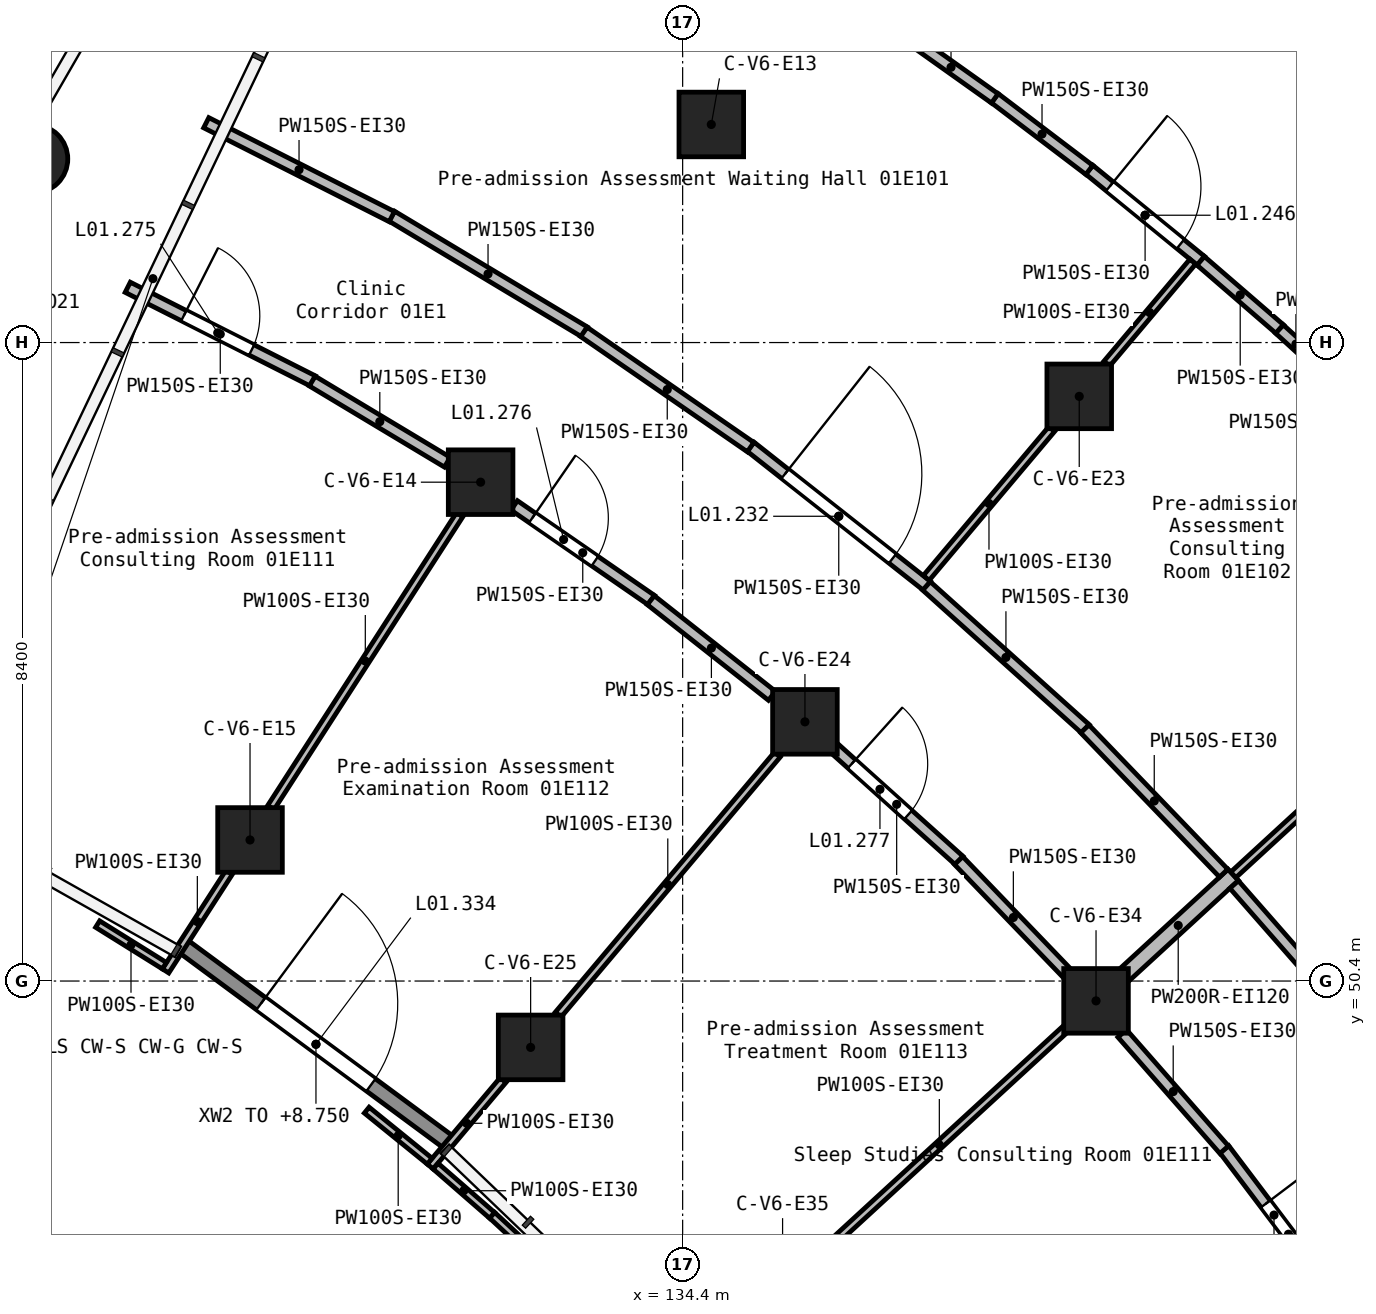
"""IFC4 building model, lengths in metres.
Left out: names, types, materials, properties, quantities, classifications, styles, units other than length and angle.
Written with IfcOpenShell. Run it as: python <this file> out.ifc"""

import sys

from ifc_helpers import new_model, si_unit, direction, frame, frame_2d, origin, origin_2d, place, context, subcontext, project, spatial, rectangle, circle, extrude, element, fill, save


model = new_model("IFC4")
c1 = context("Model", 3, precision=1e-05, world=origin(), true_north=direction((0.0, 1.0)))
c2 = subcontext(c1, "Body", "Model", "MODEL_VIEW")
j1 = project(units=[si_unit("LENGTHUNIT", "METRE"), si_unit("PLANEANGLEUNIT", "RADIAN")], contexts=[c1])
p1 = place(None, origin())
s1 = spatial("IfcSite", under=j1, at=p1, CompositionType="ELEMENT")
p2 = place(p1, origin())
s2 = spatial("IfcBuilding", under=s1, at=p2, CompositionType="ELEMENT")
p3 = place(p2, frame((0.0, 0.0, 5.4)))
s3 = spatial("IfcBuildingStorey", under=s2, at=p3, CompositionType="ELEMENT", Elevation=5.4)
p4 = place(p3, frame((125.86, 61.216, 0.0), z_axis=(0.0, 0.0, 1.0), x_axis=(1.0, 0.0, 0.0)))
e1 = element("IfcColumn", 1, at=p4, inside=s3, PredefinedType="COLUMN", context=c2, shape_type="SweptSolid", body=[
    extrude(circle(Radius=0.45, at=origin_2d()), origin(), (0.0, 0.0, 1.0), 4.5),
])
for number, where, z_axis, x_axis in (
    (2, (128.708, 52.256, 0.0), (0.0, 0.0, 1.0), (1.0, 0.0, 0.0)),
    (3, (131.742, 56.963, 0.0), (0.0, 0.0, 1.0), (1.0, 0.0, 0.0)),
    (4, (132.4, 49.527, 0.0), (0.0, 0.0, 1.0), (1.0, 0.0, 0.0)),
    (5, (134.777, 61.669, 0.0), (0.0, 0.0, 1.0), (1.0, 0.0, 0.0)),
    (6, (136.009, 53.81, 0.0), (0.0, 0.0, 1.0), (1.0, 0.0, 0.0)),
    (7, (139.618, 58.092, 0.0), (0.0, 0.0, 1.0), (1.0, 0.0, 0.0)),
    (8, (139.839, 50.139, 0.0), (0.0, 0.0, 1.0), (1.0, 0.0, 0.0)),
):
    element("IfcColumn", number, at=place(p3, frame(where, z_axis=z_axis, x_axis=x_axis)), inside=s3, PredefinedType="COLUMN", context=c2, shape_type="SweptSolid", body=[
        extrude(rectangle(XDim=0.85, YDim=0.85, at=origin_2d()), origin(), (0.0, 0.0, 1.0), 4.5),
    ])
p5 = place(p3, frame((127.819, 50.866, 0.0), z_axis=(0.0, 0.0, 1.0), x_axis=(0.804238862444, -0.594306193923, 0.0)))
e9 = element("IfcWall", 9, at=p5, inside=s3, PredefinedType="STANDARD", context=c2, shape_type="SweptSolid", body=[
    extrude(rectangle(XDim=4.368, YDim=0.2, at=frame_2d((2.184, 0.0))), origin(), (0.0, 0.0, 1.0), 3.35),
])
p6 = place(p5, frame((1.284, 0.0, 0.0)))
e10 = element("IfcOpeningElement", 10, at=p6, cuts=e9, PredefinedType="OPENING", context=c2, shape_type="SweptSolid", body=[
    extrude(rectangle(XDim=1.8, YDim=2.4, at=frame_2d((0.9, 1.2))), frame((0.0, 0.11, 0.0), z_axis=(0.0, -1.0, 0.0), x_axis=(1.0, 0.0, 0.0)), (0.0, 0.0, 1.0), 0.22),
])
p7 = place(p3, frame((140.196, 50.467, 0.0), z_axis=(0.0, 0.0, 1.0), x_axis=(0.736519787736, 0.676415997943, 0.0)))
e11 = element("IfcWall", 11, at=p7, inside=s3, PredefinedType="SOLIDWALL", context=c2, shape_type="SweptSolid", body=[
    extrude(rectangle(XDim=1.966, YDim=0.2, at=frame_2d((0.983, 0.0))), origin(), (0.0, 0.0, 1.0), 4.15),
])
p8 = place(p3, frame((135.293, 57.43, 0.0), z_axis=(0.0, 0.0, 1.0), x_axis=(0.785039104315, -0.619446208073, 0.0)))
e12 = element("IfcWall", 12, at=p8, inside=s3, PredefinedType="PARTITIONING", context=c2, shape_type="SweptSolid", body=[
    extrude(rectangle(XDim=2.958, YDim=0.15, at=frame_2d((1.479, 0.0))), origin(), (0.0, 0.0, 1.0), 4.15),
])
p9 = place(p8, frame((0.579, 0.0, 0.0)))
e13 = element("IfcOpeningElement", 13, at=p9, cuts=e12, PredefinedType="OPENING", context=c2, shape_type="SweptSolid", body=[
    extrude(rectangle(XDim=1.8, YDim=2.1, at=frame_2d((0.9, 1.05))), frame((0.0, 0.085, 0.0), z_axis=(0.0, -1.0, 0.0), x_axis=(1.0, 0.0, 0.0)), (0.0, 0.0, 1.0), 0.17),
])
p10 = place(p3, frame((130.572, 60.464, 0.0), z_axis=(0.0, 0.0, 1.0), x_axis=(0.857369075188, -0.514702116676, 0.0)))
e14 = element("IfcWall", 14, at=p10, inside=s3, PredefinedType="PARTITIONING", context=c2, shape_type="SweptSolid", body=[
    extrude(rectangle(XDim=2.958, YDim=0.15, at=frame_2d((1.479, 0.0))), origin(), (0.0, 0.0, 1.0), 4.15),
])
p11 = place(p3, frame((141.656, 51.669, 0.0), z_axis=(0.0, 0.0, 1.0), x_axis=(0.659076402407, -0.752075990702, 0.0)))
e15 = element("IfcWall", 15, at=p11, inside=s3, PredefinedType="PARTITIONING", context=c2, shape_type="SweptSolid", body=[
    extrude(rectangle(XDim=2.78, YDim=0.15, at=frame_2d((1.39, 0.0))), origin(), (0.0, 0.0, 1.0), 4.15),
])
p12 = place(p3, frame((137.608, 55.598, 0.0), z_axis=(0.0, 0.0, 1.0), x_axis=(0.743501368773, -0.668734412628, 0.0)))
e16 = element("IfcWall", 16, at=p12, inside=s3, PredefinedType="PARTITIONING", context=c2, shape_type="SweptSolid", body=[
    extrude(rectangle(XDim=2.812, YDim=0.15, at=frame_2d((1.406, 0.0))), origin(), (0.0, 0.0, 1.0), 4.15),
])
p13 = place(p3, frame((133.101, 58.94, 0.0), z_axis=(0.0, 0.0, 1.0), x_axis=(0.822620530797, -0.568590768754, 0.0)))
e17 = element("IfcWall", 17, at=p13, inside=s3, PredefinedType="PARTITIONING", context=c2, shape_type="SweptSolid", body=[
    extrude(rectangle(XDim=2.666, YDim=0.15, at=frame_2d((1.333, 0.0))), origin(), (0.0, 0.0, 1.0), 4.15),
])
p14 = place(p3, frame((139.691, 53.718, 0.0), z_axis=(0.0, 0.0, 1.0), x_axis=(0.693447550136, -0.720507109757, 0.0)))
e18 = element("IfcWall", 18, at=p14, inside=s3, PredefinedType="PARTITIONING", context=c2, shape_type="SweptSolid", body=[
    extrude(rectangle(XDim=2.635, YDim=0.15, at=frame_2d((1.317, 0.0))), origin(), (0.0, 0.0, 1.0), 4.15),
])
p15 = place(p3, frame((128.132, 61.692, 0.0), z_axis=(0.0, 0.0, 1.0), x_axis=(0.892275475515, -0.45149139061, 0.0)))
e19 = element("IfcWall", 19, at=p15, inside=s3, PredefinedType="PARTITIONING", context=c2, shape_type="SweptSolid", body=[
    extrude(rectangle(XDim=2.736, YDim=0.15, at=frame_2d((1.368, 0.0))), origin(), (0.0, 0.0, 1.0), 4.15),
])
p16 = place(p3, frame((136.393, 53.465, 0.0), z_axis=(0.0, 0.0, 1.0), x_axis=(0.743617683722, -0.668605070618, 0.0)))
e20 = element("IfcWall", 20, at=p16, inside=s3, PredefinedType="PARTITIONING", context=c2, shape_type="SweptSolid", body=[
    extrude(rectangle(XDim=2.213, YDim=0.15, at=frame_2d((1.106, 0.0))), origin(), (0.0, 0.0, 1.0), 4.15),
])
p17 = place(p16, frame((0.311, 0.0, 0.0)))
e21 = element("IfcOpeningElement", 21, at=p17, cuts=e20, PredefinedType="OPENING", context=c2, shape_type="SweptSolid", body=[
    extrude(rectangle(XDim=1.0, YDim=2.1, at=frame_2d((0.5, 1.05))), frame((0.0, 0.085, 0.0), z_axis=(0.0, -1.0, 0.0), x_axis=(1.0, 0.0, 0.0)), (0.0, 0.0, 1.0), 0.17),
])
p18 = place(p3, frame((132.184, 56.658, 0.0), z_axis=(0.0, 0.0, 1.0), x_axis=(0.82273696549, -0.568422277551, 0.0)))
e22 = element("IfcWall", 22, at=p18, inside=s3, PredefinedType="PARTITIONING", context=c2, shape_type="SweptSolid", body=[
    extrude(rectangle(XDim=2.193, YDim=0.15, at=frame_2d((1.096, 0.0))), origin(), (0.0, 0.0, 1.0), 4.15),
])
p19 = place(p18, frame((0.29, 0.0, 0.0)))
e23 = element("IfcOpeningElement", 23, at=p19, cuts=e22, PredefinedType="OPENING", context=c2, shape_type="SweptSolid", body=[
    extrude(rectangle(XDim=1.0, YDim=2.1, at=frame_2d((0.5, 1.05))), frame((0.0, 0.085, 0.0), z_axis=(0.0, -1.0, 0.0), x_axis=(1.0, 0.0, 0.0)), (0.0, 0.0, 1.0), 0.17),
])
p20 = place(p3, frame((141.526, 48.188, 0.0), z_axis=(0.0, 0.0, 1.0), x_axis=(0.60280129331, -0.797891346477, 0.0)))
e24 = element("IfcWall", 24, at=p20, inside=s3, PredefinedType="PARTITIONING", context=c2, shape_type="SweptSolid", body=[
    extrude(rectangle(XDim=2.172, YDim=0.15, at=frame_2d((1.086, 0.0))), origin(), (0.0, 0.0, 1.0), 4.15),
])
p21 = place(p20, frame((0.902, 0.0, 0.0)))
e25 = element("IfcOpeningElement", 25, at=p21, cuts=e24, PredefinedType="OPENING", context=c2, shape_type="SweptSolid", body=[
    extrude(rectangle(XDim=1.0, YDim=2.1, at=frame_2d((0.5, 1.05))), frame((0.0, 0.085, 0.0), z_axis=(0.0, -1.0, 0.0), x_axis=(1.0, 0.0, 0.0)), (0.0, 0.0, 1.0), 0.17),
])
p22 = place(p3, frame((127.099, 59.527, 0.0), z_axis=(0.0, 0.0, 1.0), x_axis=(0.892287657908, -0.451467313928, 0.0)))
e26 = element("IfcWall", 26, at=p22, inside=s3, PredefinedType="PARTITIONING", context=c2, shape_type="SweptSolid", body=[
    extrude(rectangle(XDim=2.729, YDim=0.15, at=frame_2d((1.364, 0.0))), origin(), (0.0, 0.0, 1.0), 4.15),
])
p23 = place(p22, frame((0.827, 0.0, 0.0)))
e27 = element("IfcOpeningElement", 27, at=p23, cuts=e26, PredefinedType="OPENING", context=c2, shape_type="SweptSolid", body=[
    extrude(rectangle(XDim=1.0, YDim=2.1, at=frame_2d((0.5, 1.05))), frame((0.0, 0.085, 0.0), z_axis=(0.0, -1.0, 0.0), x_axis=(1.0, 0.0, 0.0)), (0.0, 0.0, 1.0), 0.17),
])
p24 = place(p3, frame((133.981, 55.41, 0.0), z_axis=(0.0, 0.0, 1.0), x_axis=(0.784968928218, -0.619535133574, 0.0)))
e28 = element("IfcWall", 28, at=p24, inside=s3, PredefinedType="PARTITIONING", context=c2, shape_type="SweptSolid", body=[
    extrude(rectangle(XDim=2.031, YDim=0.15, at=frame_2d((1.015, 0.0))), origin(), (0.0, 0.0, 1.0), 4.15),
])
p25 = place(p3, frame((129.527, 58.293, 0.0), z_axis=(0.0, 0.0, 1.0), x_axis=(0.8573370195, -0.514755509922, 0.0)))
e29 = element("IfcWall", 29, at=p25, inside=s3, PredefinedType="PARTITIONING", context=c2, shape_type="SweptSolid", body=[
    extrude(rectangle(XDim=2.073, YDim=0.15, at=frame_2d((1.037, 0.0))), origin(), (0.0, 0.0, 1.0), 4.15),
])
p26 = place(p3, frame((140.184, 49.71, 0.0), z_axis=(0.0, 0.0, 1.0), x_axis=(0.659209376091, -0.751959439381, 0.0)))
e30 = element("IfcWall", 30, at=p26, inside=s3, PredefinedType="PARTITIONING", context=c2, shape_type="SweptSolid", body=[
    extrude(rectangle(XDim=2.035, YDim=0.15, at=frame_2d((1.017, 0.0))), origin(), (0.0, 0.0, 1.0), 4.15),
])
p27 = place(p3, frame((138.031, 51.985, 0.0), z_axis=(0.0, 0.0, 1.0), x_axis=(0.693216793474, -0.7207291289, 0.0)))
e31 = element("IfcWall", 31, at=p27, inside=s3, PredefinedType="PARTITIONING", context=c2, shape_type="SweptSolid", body=[
    extrude(rectangle(XDim=2.076, YDim=0.15, at=frame_2d((1.038, 0.0))), origin(), (0.0, 0.0, 1.0), 4.15),
])
p28 = place(p3, frame((139.75, 61.074, 0.0), z_axis=(0.0, 0.0, 1.0), x_axis=(0.774713973469, -0.63231183708, 0.0)))
e32 = element("IfcWall", 32, at=p28, inside=s3, PredefinedType="PARTITIONING", context=c2, shape_type="SweptSolid", body=[
    extrude(rectangle(XDim=1.896, YDim=0.15, at=frame_2d((0.948, 0.0))), origin(), (0.0, 0.0, 1.0), 4.15),
])
p29 = place(p28, frame((0.348, 0.0, 0.0)))
e33 = element("IfcOpeningElement", 33, at=p29, cuts=e32, PredefinedType="OPENING", context=c2, shape_type="SweptSolid", body=[
    extrude(rectangle(XDim=1.2, YDim=2.1, at=frame_2d((0.6, 1.05))), frame((0.0, 0.085, 0.0), z_axis=(0.0, -1.0, 0.0), x_axis=(1.0, 0.0, 0.0)), (0.0, 0.0, 1.0), 0.17),
])
p30 = place(p3, frame((138.506, 62.015, 0.0), z_axis=(0.0, 0.0, 1.0), x_axis=(0.7964030968, -0.604766159278, 0.0)))
e34 = element("IfcWall", 34, at=p30, inside=s3, PredefinedType="PARTITIONING", context=c2, shape_type="SweptSolid", body=[
    extrude(rectangle(XDim=1.562, YDim=0.15, at=frame_2d((0.781, 0.0))), origin(), (0.0, 0.0, 1.0), 4.15),
])
p31 = place(p3, frame((137.355, 62.831, 0.0), z_axis=(0.0, 0.0, 1.0), x_axis=(0.815004293048, -0.579454918276, 0.0)))
e35 = element("IfcWall", 35, at=p31, inside=s3, PredefinedType="PARTITIONING", context=c2, shape_type="SweptSolid", body=[
    extrude(rectangle(XDim=1.413, YDim=0.15, at=frame_2d((0.706, 0.0))), origin(), (0.0, 0.0, 1.0), 4.15),
])
p32 = place(p3, frame((141.216, 59.875, 0.0), z_axis=(0.0, 0.0, 1.0), x_axis=(0.7566031668, -0.653874336542, 0.0)))
e36 = element("IfcWall", 36, at=p32, inside=s3, PredefinedType="PARTITIONING", context=c2, shape_type="SweptSolid", body=[
    extrude(rectangle(XDim=1.374, YDim=0.15, at=frame_2d((0.687, 0.0))), origin(), (0.0, 0.0, 1.0), 4.15),
])
p33 = place(p3, frame((142.253, 58.977, 0.0), z_axis=(0.0, 0.0, 1.0), x_axis=(0.739127036188, -0.673566050492, 0.0)))
e37 = element("IfcWall", 37, at=p33, inside=s3, PredefinedType="PARTITIONING", context=c2, shape_type="SweptSolid", body=[
    extrude(rectangle(XDim=0.585, YDim=0.15, at=frame_2d((0.292, 0.0))), origin(), (0.0, 0.0, 1.0), 4.15),
])
p34 = place(p3, frame((131.079, 47.96, 0.0), z_axis=(0.0, 0.0, 1.0), x_axis=(0.644403525256, 0.764685619479, 0.0)))
e38 = element("IfcWall", 38, at=p34, inside=s3, PredefinedType="PARTITIONING", context=c2, shape_type="SweptSolid", body=[
    extrude(rectangle(XDim=1.488, YDim=0.1, at=frame_2d((0.744, 0.0))), origin(), (0.0, 0.0, 1.0), 4.15),
])
p35 = place(p3, frame((132.762, 49.958, 0.0), z_axis=(0.0, 0.0, 1.0), x_axis=(0.644429680937, 0.76466357722, 0.0)))
e39 = element("IfcWall", 39, at=p35, inside=s3, PredefinedType="PARTITIONING", context=c2, shape_type="SweptSolid", body=[
    extrude(rectangle(XDim=4.475, YDim=0.1, at=frame_2d((2.238, 0.0))), origin(), (0.0, 0.0, 1.0), 4.15),
])
p36 = place(p3, frame((127.597, 50.533, 0.0), z_axis=(0.0, 0.0, 1.0), x_axis=(0.541741092646, 0.840545411348, 0.0)))
e40 = element("IfcWall", 40, at=p36, inside=s3, PredefinedType="PARTITIONING", context=c2, shape_type="SweptSolid", body=[
    extrude(rectangle(XDim=1.543, YDim=0.1, at=frame_2d((0.771, 0.0))), origin(), (0.0, 0.0, 1.0), 4.15),
])
p37 = place(p3, frame((128.983, 52.683, 0.0), z_axis=(0.0, 0.0, 1.0), x_axis=(0.541806664818, 0.840503145716, 0.0)))
e41 = element("IfcWall", 41, at=p37, inside=s3, PredefinedType="PARTITIONING", context=c2, shape_type="SweptSolid", body=[
    extrude(rectangle(XDim=4.585, YDim=0.1, at=frame_2d((2.293, 0.0))), origin(), (0.0, 0.0, 1.0), 4.15),
])
p38 = place(p3, frame((136.111, 46.715, 0.0), z_axis=(0.0, 0.0, 1.0), x_axis=(0.736475017651, 0.676464742892, 0.0)))
e42 = element("IfcWall", 42, at=p38, inside=s3, PredefinedType="PARTITIONING", context=c2, shape_type="SweptSolid", body=[
    extrude(rectangle(XDim=4.524, YDim=0.1, at=frame_2d((2.262, 0.0))), origin(), (0.0, 0.0, 1.0), 4.15),
])
p39 = place(p3, frame((141.645, 51.798, 0.0), z_axis=(0.0, 0.0, 1.0), x_axis=(0.73658314114, 0.676347008709, 0.0)))
e43 = element("IfcWall", 43, at=p39, inside=s3, PredefinedType="PARTITIONING", context=c2, shape_type="SweptSolid", body=[
    extrude(rectangle(XDim=2.61, YDim=0.1, at=frame_2d((1.305, 0.0))), origin(), (0.0, 0.0, 1.0), 4.15),
])
p40 = place(p3, frame((137.605, 55.704, 0.0), z_axis=(0.0, 0.0, 1.0), x_axis=(0.644432238292, 0.764661421971, 0.0)))
e44 = element("IfcWall", 44, at=p40, inside=s3, PredefinedType="PARTITIONING", context=c2, shape_type="SweptSolid", body=[
    extrude(rectangle(XDim=2.561, YDim=0.1, at=frame_2d((1.28, 0.0))), origin(), (0.0, 0.0, 1.0), 4.15),
])
p41 = place(p3, frame((139.98, 58.522, 0.0), z_axis=(0.0, 0.0, 1.0), x_axis=(0.644495278204, 0.7646082895, 0.0)))
e45 = element("IfcWall", 45, at=p41, inside=s3, PredefinedType="PARTITIONING", context=c2, shape_type="SweptSolid", body=[
    extrude(rectangle(XDim=1.756, YDim=0.1, at=frame_2d((0.878, 0.0))), origin(), (0.0, 0.0, 1.0), 4.15),
])
p42 = place(p3, frame((130.243, 48.701, 0.0), z_axis=(0.0, 0.0, 1.0), x_axis=(0.776695177638, -0.629876655413, 0.0)))
e46 = element("IfcWall", 46, at=p42, inside=s3, PredefinedType="PARTITIONING", context=c2, shape_type="SweptSolid", body=[
    extrude(rectangle(XDim=1.066, YDim=0.1, at=frame_2d((0.533, 0.0))), origin(), (0.0, 0.0, 1.0), 4.15),
])
p43 = place(p3, frame((126.703, 51.149, 0.0), z_axis=(0.0, 0.0, 1.0), x_axis=(0.848687049906, -0.528895350067, 0.0)))
e47 = element("IfcWall", 47, at=p43, inside=s3, PredefinedType="PARTITIONING", context=c2, shape_type="SweptSolid", body=[
    extrude(rectangle(XDim=1.034, YDim=0.1, at=frame_2d((0.517, 0.0))), origin(), (0.0, 0.0, 1.0), 4.15),
])
p44 = place(p3, frame((131.892, 47.32, 0.0), z_axis=(0.0, 0.0, 1.0), x_axis=(0.732793491626, -0.680451099367, 0.0)))
e48 = element("IfcWall", 48, at=p44, inside=s3, PredefinedType="PARTITIONING", context=c2, shape_type="SweptSolid", body=[
    extrude(rectangle(XDim=1.185, YDim=0.1, at=frame_2d((0.592, 0.0))), origin(), (0.0, 0.0, 1.0), 4.15),
])
p45 = place(p3, frame((131.149, 47.965, 0.0), z_axis=(0.0, 0.0, 1.0), x_axis=(0.75424788942, -0.656589766373, 0.0)))
e49 = element("IfcWall", 49, at=p45, inside=s3, PredefinedType="PARTITIONING", context=c2, shape_type="SweptSolid", body=[
    extrude(rectangle(XDim=0.985, YDim=0.1, at=frame_2d((0.492, 0.0))), origin(), (0.0, 0.0, 1.0), 4.15),
])
p46 = place(p6, origin())
e50 = element("IfcDoor", 50, at=p46, inside=s3, OperationType="SINGLE_SWING_LEFT", PredefinedType="DOOR", context=c2, shape_type="SweptSolid", body=[
    extrude(rectangle(XDim=1.8, YDim=2.4, at=frame_2d((0.9, 1.2))), frame((0.0, 0.025, 0.0), z_axis=(0.0, -1.0, 0.0), x_axis=(1.0, 0.0, 0.0)), (0.0, 0.0, 1.0), 0.05),
])
fill(e10, e50)
p47 = place(p9, frame((1.8, 0.0, 0.0), z_axis=(0.0, 0.0, 1.0), x_axis=(-1.0, 0.0, 0.0)))
e51 = element("IfcDoor", 51, at=p47, inside=s3, OperationType="DOUBLE_DOOR_SINGLE_SWING", PredefinedType="DOOR", context=c2, shape_type="SweptSolid", body=[
    extrude(rectangle(XDim=1.8, YDim=2.1, at=frame_2d((0.9, 1.05))), frame((0.0, 0.025, 0.0), z_axis=(0.0, -1.0, 0.0), x_axis=(1.0, 0.0, 0.0)), (0.0, 0.0, 1.0), 0.05),
])
fill(e13, e51)
p48 = place(p29, origin())
e52 = element("IfcDoor", 52, at=p48, inside=s3, OperationType="SINGLE_SWING_RIGHT", PredefinedType="DOOR", context=c2, shape_type="SweptSolid", body=[
    extrude(rectangle(XDim=1.2, YDim=2.1, at=frame_2d((0.6, 1.05))), frame((0.0, 0.025, 0.0), z_axis=(0.0, -1.0, 0.0), x_axis=(1.0, 0.0, 0.0)), (0.0, 0.0, 1.0), 0.05),
])
fill(e33, e52)
p49 = place(p23, frame((1.0, 0.0, 0.0), z_axis=(0.0, 0.0, 1.0), x_axis=(-1.0, 0.0, 0.0)))
e53 = element("IfcDoor", 53, at=p49, inside=s3, OperationType="SINGLE_SWING_RIGHT", PredefinedType="DOOR", context=c2, shape_type="SweptSolid", body=[
    extrude(rectangle(XDim=1.0, YDim=2.1, at=frame_2d((0.5, 1.05))), frame((0.0, 0.025, 0.0), z_axis=(0.0, -1.0, 0.0), x_axis=(1.0, 0.0, 0.0)), (0.0, 0.0, 1.0), 0.05),
])
fill(e27, e53)
p50 = place(p19, frame((1.0, 0.0, 0.0), z_axis=(0.0, 0.0, 1.0), x_axis=(-1.0, 0.0, 0.0)))
e54 = element("IfcDoor", 54, at=p50, inside=s3, OperationType="SINGLE_SWING_RIGHT", PredefinedType="DOOR", context=c2, shape_type="SweptSolid", body=[
    extrude(rectangle(XDim=1.0, YDim=2.1, at=frame_2d((0.5, 1.05))), frame((0.0, 0.025, 0.0), z_axis=(0.0, -1.0, 0.0), x_axis=(1.0, 0.0, 0.0)), (0.0, 0.0, 1.0), 0.05),
])
fill(e23, e54)
p51 = place(p17, frame((1.0, 0.0, 0.0), z_axis=(0.0, 0.0, 1.0), x_axis=(-1.0, 0.0, 0.0)))
e55 = element("IfcDoor", 55, at=p51, inside=s3, OperationType="SINGLE_SWING_RIGHT", PredefinedType="DOOR", context=c2, shape_type="SweptSolid", body=[
    extrude(rectangle(XDim=1.0, YDim=2.1, at=frame_2d((0.5, 1.05))), frame((0.0, 0.025, 0.0), z_axis=(0.0, -1.0, 0.0), x_axis=(1.0, 0.0, 0.0)), (0.0, 0.0, 1.0), 0.05),
])
fill(e21, e55)
p52 = place(p21, frame((1.0, 0.0, 0.0), z_axis=(0.0, 0.0, 1.0), x_axis=(-1.0, 0.0, 0.0)))
e56 = element("IfcDoor", 56, at=p52, inside=s3, OperationType="SINGLE_SWING_LEFT", PredefinedType="DOOR", context=c2, shape_type="SweptSolid", body=[
    extrude(rectangle(XDim=1.0, YDim=2.1, at=frame_2d((0.5, 1.05))), frame((0.0, 0.025, 0.0), z_axis=(0.0, -1.0, 0.0), x_axis=(1.0, 0.0, 0.0)), (0.0, 0.0, 1.0), 0.05),
])
fill(e25, e56)
save(model, sys.argv[1])
